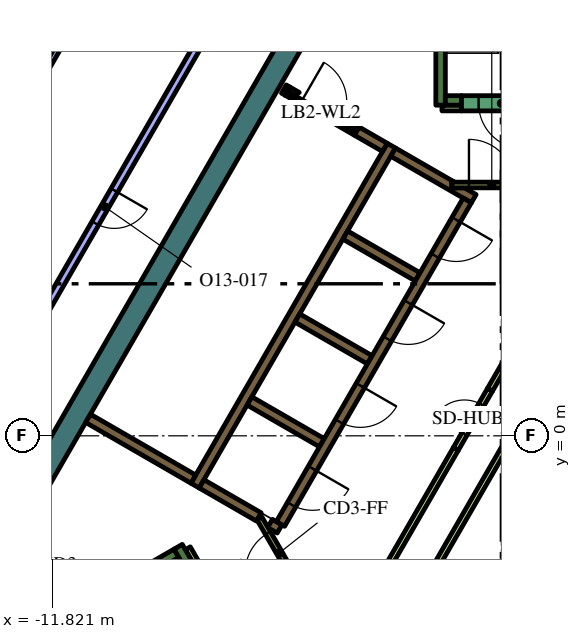
"""IFC4 building model, lengths in metres.
Left out: names, types, materials, properties, quantities, classifications, styles, units other than length and angle.
Written with IfcOpenShell. Run it as: python <this file> out.ifc"""

import sys

from ifc_helpers import new_model, si_unit, direction, frame, frame_2d, origin, place, context, subcontext, project, spatial, polyline, rectangle, outline, extrude, element, fill, save


model = new_model("IFC4")
c1 = context("Model", 3, precision=1e-05, world=origin(), true_north=direction((0.0, 1.0)))
c2 = subcontext(c1, "Body", "Model", "MODEL_VIEW")
j1 = project(units=[si_unit("LENGTHUNIT", "METRE"), si_unit("PLANEANGLEUNIT", "RADIAN")], contexts=[c1])
p1 = place(None, origin())
s1 = spatial("IfcSite", under=j1, at=p1, CompositionType="ELEMENT")
p2 = place(p1, origin())
s2 = spatial("IfcBuilding", under=s1, at=p2, CompositionType="ELEMENT")
p3 = place(p2, frame((0.0, 0.0, 300.6)))
s3 = spatial("IfcBuildingStorey", under=s2, at=p3, CompositionType="ELEMENT", Elevation=300.6)
p4 = place(p3, frame((-12.582, -1.892, 0.0), z_axis=(0.0, 0.0, 1.0), x_axis=(0.500003640647, 0.866023301845, 0.0)))
e1 = element("IfcWall", 1, at=p4, inside=s3, PredefinedType="SOLIDWALL", context=c2, shape_type="SweptSolid", body=[
    extrude(rectangle(XDim=15.858, YDim=0.6, at=frame_2d((7.929, 0.0))), origin(), (0.0, 0.0, 1.0), 4.2),
])
p5 = place(p3, frame((-1.6, 8.7, 0.0), z_axis=(0.0, 0.0, 1.0), x_axis=(0.0, 1.0, 0.0)))
e2 = element("IfcWall", 2, at=p5, inside=s3, PredefinedType="SOLIDWALL", context=c2, shape_type="SweptSolid", body=[
    extrude(rectangle(XDim=7.05, YDim=0.25, at=frame_2d((3.525, 0.0))), origin(), (0.0, 0.0, 1.0), 4.2),
])
p6 = place(p3, frame((-1.475, 8.825, 0.0), z_axis=(0.0, 0.0, 1.0), x_axis=(1.0, 0.0, 0.0)))
e3 = element("IfcWall", 3, at=p6, inside=s3, PredefinedType="SOLIDWALL", context=c2, shape_type="SweptSolid", body=[
    extrude(rectangle(XDim=0.425, YDim=0.25, at=frame_2d((0.212, 0.0))), origin(), (0.0, 0.0, 1.0), 4.2),
])
p7 = place(p3, frame((-14.44, -6.49, 0.0), z_axis=(0.0, 0.0, 1.0), x_axis=(0.866022966069, 0.500004222222, 0.0)))
e4 = element("IfcWall", 4, at=p7, inside=s3, PredefinedType="SOLIDWALL", context=c2, shape_type="SweptSolid", body=[
    extrude(rectangle(XDim=6.8, YDim=0.25, at=frame_2d((3.4, 0.0))), origin(), (0.0, 0.0, 1.0), 4.2),
])
p8 = place(p3, frame((-8.168, -3.503, 0.0), z_axis=(0.0, 0.0, 1.0), x_axis=(-0.499952099219, 0.866053057547, 0.0)))
e5 = element("IfcWall", 5, at=p8, inside=s3, PredefinedType="SOLIDWALL", context=c2, shape_type="SweptSolid", body=[
    extrude(rectangle(XDim=0.675, YDim=0.25, at=frame_2d((0.337, 0.0))), origin(), (0.0, 0.0, 1.0), 4.2),
])
p9 = place(p3, frame((-8.06, -1.311, 0.0), z_axis=(0.0, 0.0, 1.0), x_axis=(0.50000273126, 0.866023826885, 0.0)))
e6 = element("IfcWall", 6, at=p9, inside=s3, PredefinedType="SOLIDWALL", context=c2, shape_type="SweptSolid", body=[
    extrude(rectangle(XDim=10.33, YDim=0.25, at=frame_2d((5.165, 0.0))), origin(), (0.0, 0.0, 1.0), 4.2),
])
p10 = place(p3, origin())
e7 = element("IfcWall", 7, at=p10, inside=s3, PredefinedType="SOLIDWALL", context=c2, shape_type="SweptSolid", body=[
    extrude(outline(polyline([(-2.912, 7.356), (-2.787, 7.573), (-1.232, 6.675), (-1.303, 6.675), (-1.304, 6.675), (-1.304, 6.675), (-1.304, 6.525), (-1.304, 6.525), (-1.303, 6.525), (-0.971, 6.525), (-0.665, 6.348), (-0.79, 6.132), (-1.007, 6.257), (-1.007, 6.257), (-2.912, 7.356)])), origin(), (0.0, 0.0, 1.0), 4.2),
])
for number, where, z_axis, x_axis in (
    (8, (-2.204, 4.182, 0.0), (0.0, 0.0, 1.0), (-0.866, 0.5, 0.0)),
    (9, (-5.369, 3.1, 0.0), (0.0, 0.0, 1.0), (0.866, -0.5, 0.0)),
    (10, (-4.724, -0.182, 0.0), (0.0, 0.0, 1.0), (-0.866, 0.5, 0.0)),
):
    element("IfcWall", number, at=place(p3, frame(where, z_axis=z_axis, x_axis=x_axis)), inside=s3, PredefinedType="SOLIDWALL", context=c2, shape_type="SweptSolid", body=[
        extrude(rectangle(XDim=2.2, YDim=0.25, at=frame_2d((1.1, 0.0))), origin(), (0.0, 0.0, 1.0), 4.2),
    ])
p11 = place(p3, frame((-6.088, -2.305, 0.0), z_axis=(0.0, 0.0, 1.0), x_axis=(0.866059450854, -0.499941024108, 0.0)))
e11 = element("IfcWall", 11, at=p11, inside=s3, PredefinedType="SOLIDWALL", context=c2, shape_type="SweptSolid", body=[
    extrude(rectangle(XDim=0.29, YDim=0.25, at=frame_2d((0.145, 0.0))), origin(), (0.0, 0.0, 1.0), 4.2),
])
p12 = place(p3, frame((-7.889, -1.265, 0.0), z_axis=(0.0, 0.0, 1.0), x_axis=(0.865986741702, -0.500066958712, 0.0)))
e12 = element("IfcWall", 12, at=p12, inside=s3, PredefinedType="SOLIDWALL", context=c2, shape_type="SweptSolid", body=[
    extrude(rectangle(XDim=1.738, YDim=0.25, at=frame_2d((0.869, 0.0))), origin(), (0.0, 0.0, 1.0), 4.2),
])
p13 = place(p3, frame((-8.106, -1.14, 0.0), z_axis=(0.0, 0.0, 1.0), x_axis=(-0.866008981251, 0.500028443584, 0.0)))
e13 = element("IfcWall", 13, at=p13, inside=s3, PredefinedType="SOLIDWALL", context=c2, shape_type="SweptSolid", body=[
    extrude(rectangle(XDim=3.2, YDim=0.25, at=frame_2d((1.6, 0.0))), origin(), (0.0, 0.0, 1.0), 4.2),
])
p14 = place(p3, frame((-5.725, 9.125, 0.0), z_axis=(0.0, 0.0, 1.0), x_axis=(0.866185586049, -0.49972245349, 0.0)))
e14 = element("IfcWall", 14, at=p14, inside=s3, PredefinedType="SOLIDWALL", context=c2, shape_type="SweptSolid", body=[
    extrude(rectangle(XDim=0.11, YDim=0.25, at=frame_2d((0.055, 0.0))), origin(), (0.0, 0.0, 1.0), 4.2),
])
p15 = place(p3, frame((-3.066, 7.59, 0.0), z_axis=(0.0, 0.0, 1.0), x_axis=(-0.866081358704, 0.49990307071, 0.0)))
e15 = element("IfcWall", 15, at=p15, inside=s3, PredefinedType="SOLIDWALL", context=c2, shape_type="SweptSolid", body=[
    extrude(rectangle(XDim=0.858, YDim=0.25, at=frame_2d((0.429, 0.0))), origin(), (0.0, 0.0, 1.0), 4.2),
])
e16 = element("IfcWall", 16, at=p10, inside=s3, PredefinedType="SOLIDWALL", context=c2, shape_type="SweptSolid", body=[
    extrude(outline(polyline([(-3.748, 8.128), (-3.813, 8.015), (-4.027, 8.139), (-4.017, 8.156), (-4.008, 8.173), (-4.0, 8.192), (-3.995, 8.21), (-3.991, 8.23), (-3.99, 8.25), (-3.99, 8.268), (-3.748, 8.128)])), origin(), (0.0, 0.0, 1.0), 4.2),
])
e17 = element("IfcWall", 17, at=p10, inside=s3, PredefinedType="SOLIDWALL", context=c2, shape_type="SweptSolid", body=[
    extrude(outline(polyline([(-5.689, 8.96), (-5.69, 8.961), (-5.565, 9.177), (-5.319, 9.035), (-5.335, 9.026), (-5.351, 9.015), (-5.366, 9.002), (-5.379, 8.988), (-5.392, 8.972), (-5.402, 8.956), (-5.412, 8.939), (-5.629, 9.064), (-5.629, 9.064), (-5.689, 8.96)])), origin(), (0.0, 0.0, 1.0), 4.2),
])
for number, where, z_axis, x_axis in (
    (18, (-8.252, -2.958, 0.0), (0.0, 0.0, 1.0), (0.5, -0.866, 0.0)),
    (19, (-1.564, 8.625, 0.0), (0.0, 0.0, 1.0), (1.0, 0.0, 0.0)),
):
    element("IfcWall", number, at=place(p3, frame(where, z_axis=z_axis, x_axis=x_axis)), inside=s3, PredefinedType="PARTITIONING", context=c2, shape_type="SweptSolid", body=[
        extrude(rectangle(XDim=0.514, YDim=0.15, at=frame_2d((0.257, 0.0))), origin(), (0.0, 0.0, 1.0), 3.55),
    ])
p16 = place(p3, frame((-1.887, -3.718, 0.0), z_axis=(0.0, 0.0, 1.0), x_axis=(0.500005008002, 0.866022512394, 0.0)))
e20 = element("IfcWall", 20, at=p16, inside=s3, PredefinedType="PARTITIONING", context=c2, shape_type="SweptSolid", body=[
    extrude(rectangle(XDim=8.327, YDim=0.15, at=frame_2d((4.164, 0.0))), origin(), (0.0, 0.0, 1.0), 3.55),
])
p17 = place(p3, frame((-3.147, -3.718, 0.0), z_axis=(0.0, 0.0, 1.0), x_axis=(0.500010131483, 0.866019554291, 0.0)))
e21 = element("IfcWall", 21, at=p17, inside=s3, PredefinedType="PARTITIONING", context=c2, shape_type="SweptSolid", body=[
    extrude(rectangle(XDim=3.894, YDim=0.15, at=frame_2d((1.947, 0.0))), origin(), (0.0, 0.0, 1.0), 3.55),
])
p18 = place(p3, frame((-0.3, 1.212, 0.0), z_axis=(0.0, 0.0, 1.0), x_axis=(0.499963101113, 0.866046706318, 0.0)))
e22 = element("IfcWall", 22, at=p18, inside=s3, PredefinedType="PARTITIONING", context=c2, shape_type="SweptSolid", body=[
    extrude(rectangle(XDim=3.893, YDim=0.15, at=frame_2d((1.947, 0.0))), origin(), (0.0, 0.0, 1.0), 3.55),
])
p19 = place(p3, frame((-0.898, 6.194, 0.0), z_axis=(0.0, 0.0, 1.0), x_axis=(-0.499996202215, -0.866027596426, 0.0)))
e23 = element("IfcWall", 23, at=p19, inside=s3, PredefinedType="SOLIDWALL", context=c2, shape_type="SweptSolid", body=[
    extrude(rectangle(XDim=9.83, YDim=0.25, at=frame_2d((4.915, 0.0))), origin(), (0.0, 0.0, 1.0), 4.2),
])
p20 = place(p19, frame((0.585, 0.0, 0.0)))
e24 = element("IfcOpeningElement", 24, at=p20, cuts=e23, PredefinedType="OPENING", context=c2, shape_type="SweptSolid", body=[
    extrude(rectangle(XDim=1.1, YDim=2.1, at=frame_2d((0.55, 1.05))), frame((0.0, 0.135, 0.0), z_axis=(0.0, -1.0, 0.0), x_axis=(1.0, 0.0, 0.0)), (0.0, 0.0, 1.0), 0.27),
])
p21 = place(p19, frame((3.105, 0.0, 0.0)))
e25 = element("IfcOpeningElement", 25, at=p21, cuts=e23, PredefinedType="OPENING", context=c2, shape_type="SweptSolid", body=[
    extrude(rectangle(XDim=1.1, YDim=2.1, at=frame_2d((0.55, 1.05))), frame((0.0, 0.135, 0.0), z_axis=(0.0, -1.0, 0.0), x_axis=(1.0, 0.0, 0.0)), (0.0, 0.0, 1.0), 0.27),
])
p22 = place(p19, frame((5.625, 0.0, 0.0)))
e26 = element("IfcOpeningElement", 26, at=p22, cuts=e23, PredefinedType="OPENING", context=c2, shape_type="SweptSolid", body=[
    extrude(rectangle(XDim=1.1, YDim=2.1, at=frame_2d((0.55, 1.05))), frame((0.0, 0.135, 0.0), z_axis=(0.0, -1.0, 0.0), x_axis=(1.0, 0.0, 0.0)), (0.0, 0.0, 1.0), 0.27),
])
p23 = place(p19, frame((8.145, 0.0, 0.0)))
e27 = element("IfcOpeningElement", 27, at=p23, cuts=e23, PredefinedType="OPENING", context=c2, shape_type="SweptSolid", body=[
    extrude(rectangle(XDim=1.1, YDim=2.1, at=frame_2d((0.55, 1.05))), frame((0.0, 0.135, 0.0), z_axis=(0.0, -1.0, 0.0), x_axis=(1.0, 0.0, 0.0)), (0.0, 0.0, 1.0), 0.27),
])
p24 = place(p3, frame((1.05, 8.75, 0.0), z_axis=(0.0, 0.0, 1.0), x_axis=(-1.0, 0.0, 0.0)))
e28 = element("IfcWall", 28, at=p24, inside=s3, PredefinedType="SOLIDWALL", context=c2, shape_type="SweptSolid", body=[
    extrude(rectangle(XDim=2.1, YDim=0.4, at=frame_2d((1.05, 0.0))), origin(), (0.0, 0.0, 1.0), 4.2),
])
p25 = place(p24, frame((0.45, 0.0, 0.0)))
e29 = element("IfcOpeningElement", 29, at=p25, cuts=e28, PredefinedType="OPENING", context=c2, shape_type="SweptSolid", body=[
    extrude(rectangle(XDim=1.2, YDim=2.1, at=frame_2d((0.6, 1.05))), frame((0.0, 0.21, 0.0), z_axis=(0.0, -1.0, 0.0), x_axis=(1.0, 0.0, 0.0)), (0.0, 0.0, 1.0), 0.42),
])
p26 = place(p3, frame((-1.303, 6.6, 0.0), z_axis=(0.0, 0.0, 1.0), x_axis=(1.0, 0.0, 0.0)))
e30 = element("IfcWall", 30, at=p26, inside=s3, PredefinedType="PARTITIONING", context=c2, shape_type="SweptSolid", body=[
    extrude(rectangle(XDim=2.1, YDim=0.15, at=frame_2d((1.05, 0.0))), origin(), (0.0, 0.0, 1.0), 4.2),
])
p27 = place(p26, frame((0.45, 0.0, 0.0)))
e31 = element("IfcOpeningElement", 31, at=p27, cuts=e30, PredefinedType="OPENING", context=c2, shape_type="SweptSolid", body=[
    extrude(rectangle(XDim=1.2, YDim=2.1, at=frame_2d((0.6, 1.05))), frame((0.0, 0.085, 0.0), z_axis=(0.0, -1.0, 0.0), x_axis=(1.0, 0.0, 0.0)), (0.0, 0.0, 1.0), 0.17),
])
p28 = place(p3, frame((-5.317, -3.99, 0.0), z_axis=(0.0, 0.0, 1.0), x_axis=(-0.500027713859, 0.866009402589, 0.0)))
e32 = element("IfcWall", 32, at=p28, inside=s3, PredefinedType="PARTITIONING", context=c2, shape_type="SweptSolid", body=[
    extrude(rectangle(XDim=2.1, YDim=0.15, at=frame_2d((1.05, 0.0))), origin(), (0.0, 0.0, 1.0), 4.2),
])
p29 = place(p28, frame((0.45, 0.0, 0.0)))
e33 = element("IfcOpeningElement", 33, at=p29, cuts=e32, PredefinedType="OPENING", context=c2, shape_type="SweptSolid", body=[
    extrude(rectangle(XDim=1.2, YDim=2.1, at=frame_2d((0.6, 1.05))), frame((0.0, 0.085, 0.0), z_axis=(0.0, -1.0, 0.0), x_axis=(1.0, 0.0, 0.0)), (0.0, 0.0, 1.0), 0.17),
])
p30 = place(p3, frame((-5.659, 9.012, 0.0), z_axis=(0.0, 0.0, 1.0), x_axis=(0.866009402589, -0.500027713859, 0.0)))
e34 = element("IfcWall", 34, at=p30, inside=s3, PredefinedType="PARTITIONING", context=c2, shape_type="SweptSolid", body=[
    extrude(rectangle(XDim=2.1, YDim=0.12, at=frame_2d((1.05, 0.0))), origin(), (0.0, 0.0, 1.0), 3.55),
])
p31 = place(p30, frame((0.45, 0.0, 0.0)))
e35 = element("IfcOpeningElement", 35, at=p31, cuts=e34, PredefinedType="OPENING", context=c2, shape_type="SweptSolid", body=[
    extrude(rectangle(XDim=1.2, YDim=2.1, at=frame_2d((0.6, 1.05))), frame((0.0, 0.07, 0.0), z_axis=(0.0, -1.0, 0.0), x_axis=(1.0, 0.0, 0.0)), (0.0, 0.0, 1.0), 0.14),
])
p32 = place(p3, frame((-1.2, -0.346, 0.0), z_axis=(0.0, 0.0, 1.0), x_axis=(0.499961193289, 0.866047807691, 0.0)))
e36 = element("IfcWall", 36, at=p32, inside=s3, PredefinedType="PARTITIONING", context=c2, shape_type="SweptSolid", body=[
    extrude(rectangle(XDim=1.8, YDim=0.15, at=frame_2d((0.9, 0.0))), origin(), (0.0, 0.0, 1.0), 3.55),
])
p33 = place(p32, frame((0.45, 0.0, 0.0)))
e37 = element("IfcOpeningElement", 37, at=p33, cuts=e36, PredefinedType="OPENING", context=c2, shape_type="SweptSolid", body=[
    extrude(rectangle(XDim=0.9, YDim=2.1, at=frame_2d((0.45, 1.05))), frame((0.0, 0.085, 0.0), z_axis=(0.0, -1.0, 0.0), x_axis=(1.0, 0.0, 0.0)), (0.0, 0.0, 1.0), 0.17),
])
p34 = place(p3, frame((-14.74, 4.887, 0.0), z_axis=(0.0, 0.0, 1.0), x_axis=(0.500007141444, 0.86602128063, 0.0)))
e38 = element("IfcWall", 38, at=p34, inside=s3, PredefinedType="PARTITIONING", context=c2, shape_type="SweptSolid", body=[
    extrude(rectangle(XDim=6.137, YDim=0.15, at=frame_2d((3.068, 0.0))), origin(), (0.0, 0.0, 1.0), 3.55),
])
p35 = place(p34, frame((2.637, 0.0, 0.0)))
e39 = element("IfcOpeningElement", 39, at=p35, cuts=e38, PredefinedType="OPENING", context=c2, shape_type="SweptSolid", body=[
    extrude(rectangle(XDim=0.9, YDim=2.1, at=frame_2d((0.45, 1.05))), frame((0.0, 0.085, 0.0), z_axis=(0.0, -1.0, 0.0), x_axis=(1.0, 0.0, 0.0)), (0.0, 0.0, 1.0), 0.17),
])
p36 = place(p3, frame((-7.436, 11.221, 0.0), z_axis=(0.0, 0.0, 1.0), x_axis=(-0.49999894854, -0.866026010844, 0.0)))
e40 = element("IfcWall", 40, at=p36, inside=s3, PredefinedType="PARTITIONING", context=c2, shape_type="SweptSolid", body=[
    extrude(rectangle(XDim=12.0, YDim=0.2, at=frame_2d((6.0, 0.0))), origin(), (0.0, 0.0, 1.0), 3.55),
])
p37 = place(p36, frame((5.5, 0.0, 0.0)))
e41 = element("IfcOpeningElement", 41, at=p37, cuts=e40, PredefinedType="OPENING", context=c2, shape_type="SweptSolid", body=[
    extrude(rectangle(XDim=1.0, YDim=2.1, at=frame_2d((0.5, 1.05))), frame((0.0, 0.11, 0.0), z_axis=(0.0, -1.0, 0.0), x_axis=(1.0, 0.0, 0.0)), (0.0, 0.0, 1.0), 0.22),
])
p38 = place(p20, origin())
e42 = element("IfcDoor", 42, at=p38, inside=s3, OperationType="DOUBLE_DOOR_SLIDING", PredefinedType="DOOR", context=c2, shape_type="SweptSolid", body=[
    extrude(rectangle(XDim=1.1, YDim=2.1, at=frame_2d((0.55, 1.05))), frame((0.0, 0.025, 0.0), z_axis=(0.0, -1.0, 0.0), x_axis=(1.0, 0.0, 0.0)), (0.0, 0.0, 1.0), 0.05),
])
fill(e24, e42)
p39 = place(p21, origin())
e43 = element("IfcDoor", 43, at=p39, inside=s3, OperationType="DOUBLE_DOOR_SLIDING", PredefinedType="DOOR", context=c2, shape_type="SweptSolid", body=[
    extrude(rectangle(XDim=1.1, YDim=2.1, at=frame_2d((0.55, 1.05))), frame((0.0, 0.025, 0.0), z_axis=(0.0, -1.0, 0.0), x_axis=(1.0, 0.0, 0.0)), (0.0, 0.0, 1.0), 0.05),
])
fill(e25, e43)
p40 = place(p22, origin())
e44 = element("IfcDoor", 44, at=p40, inside=s3, OperationType="DOUBLE_DOOR_SLIDING", PredefinedType="DOOR", context=c2, shape_type="SweptSolid", body=[
    extrude(rectangle(XDim=1.1, YDim=2.1, at=frame_2d((0.55, 1.05))), frame((0.0, 0.025, 0.0), z_axis=(0.0, -1.0, 0.0), x_axis=(1.0, 0.0, 0.0)), (0.0, 0.0, 1.0), 0.05),
])
fill(e26, e44)
p41 = place(p23, origin())
e45 = element("IfcDoor", 45, at=p41, inside=s3, OperationType="DOUBLE_DOOR_SLIDING", PredefinedType="DOOR", context=c2, shape_type="SweptSolid", body=[
    extrude(rectangle(XDim=1.1, YDim=2.1, at=frame_2d((0.55, 1.05))), frame((0.0, 0.025, 0.0), z_axis=(0.0, -1.0, 0.0), x_axis=(1.0, 0.0, 0.0)), (0.0, 0.0, 1.0), 0.05),
])
fill(e27, e45)
p42 = place(p25, origin())
e46 = element("IfcDoor", 46, at=p42, inside=s3, OperationType="SINGLE_SWING_LEFT", PredefinedType="DOOR", context=c2, shape_type="SweptSolid", body=[
    extrude(rectangle(XDim=1.2, YDim=2.1, at=frame_2d((0.6, 1.05))), frame((0.0, 0.025, 0.0), z_axis=(0.0, -1.0, 0.0), x_axis=(1.0, 0.0, 0.0)), (0.0, 0.0, 1.0), 0.05),
])
fill(e29, e46)
p43 = place(p27, origin())
e47 = element("IfcDoor", 47, at=p43, inside=s3, OperationType="SINGLE_SWING_LEFT", PredefinedType="DOOR", context=c2, shape_type="SweptSolid", body=[
    extrude(rectangle(XDim=1.2, YDim=2.1, at=frame_2d((0.6, 1.05))), frame((0.0, 0.025, 0.0), z_axis=(0.0, -1.0, 0.0), x_axis=(1.0, 0.0, 0.0)), (0.0, 0.0, 1.0), 0.05),
])
fill(e31, e47)
p44 = place(p29, origin())
e48 = element("IfcDoor", 48, at=p44, inside=s3, OperationType="SINGLE_SWING_LEFT", PredefinedType="DOOR", context=c2, shape_type="SweptSolid", body=[
    extrude(rectangle(XDim=1.2, YDim=2.1, at=frame_2d((0.6, 1.05))), frame((0.0, 0.025, 0.0), z_axis=(0.0, -1.0, 0.0), x_axis=(1.0, 0.0, 0.0)), (0.0, 0.0, 1.0), 0.05),
])
fill(e33, e48)
p45 = place(p31, origin())
e49 = element("IfcDoor", 49, at=p45, inside=s3, OperationType="SINGLE_SWING_LEFT", PredefinedType="DOOR", context=c2, shape_type="SweptSolid", body=[
    extrude(rectangle(XDim=1.2, YDim=2.1, at=frame_2d((0.6, 1.05))), frame((0.0, 0.025, 0.0), z_axis=(0.0, -1.0, 0.0), x_axis=(1.0, 0.0, 0.0)), (0.0, 0.0, 1.0), 0.05),
])
fill(e35, e49)
p46 = place(p33, origin())
e50 = element("IfcDoor", 50, at=p46, inside=s3, OperationType="SINGLE_SWING_LEFT", PredefinedType="DOOR", context=c2, shape_type="SweptSolid", body=[
    extrude(rectangle(XDim=0.9, YDim=2.1, at=frame_2d((0.45, 1.05))), frame((0.0, 0.025, 0.0), z_axis=(0.0, -1.0, 0.0), x_axis=(1.0, 0.0, 0.0)), (0.0, 0.0, 1.0), 0.05),
])
fill(e37, e50)
p47 = place(p37, origin())
e51 = element("IfcDoor", 51, at=p47, inside=s3, OperationType="SINGLE_SWING_RIGHT", PredefinedType="DOOR", context=c2, shape_type="SweptSolid", body=[
    extrude(rectangle(XDim=1.0, YDim=2.1, at=frame_2d((0.5, 1.05))), frame((0.0, 0.025, 0.0), z_axis=(0.0, -1.0, 0.0), x_axis=(1.0, 0.0, 0.0)), (0.0, 0.0, 1.0), 0.05),
])
fill(e41, e51)
save(model, sys.argv[1])
